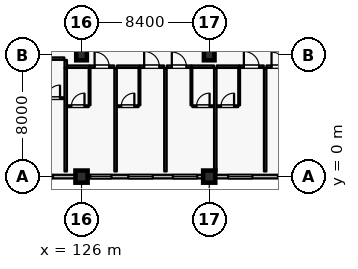
"""IFC4 building model, lengths in metres.
Left out: names, types, materials, properties, quantities, classifications, styles, units other than length and angle.
Written with IfcOpenShell. Run it as: python <this file> out.ifc"""

import sys

from ifc_helpers import new_model, si_unit, direction, frame, frame_2d, origin, origin_2d, place, context, subcontext, project, spatial, rectangle, extrude, element, fill, save


model = new_model("IFC4")
c1 = context("Model", 3, precision=1e-05, world=origin(), true_north=direction((0.0, 1.0)))
c2 = subcontext(c1, "Body", "Model", "MODEL_VIEW")
j1 = project(units=[si_unit("LENGTHUNIT", "METRE"), si_unit("PLANEANGLEUNIT", "RADIAN")], contexts=[c1])
p1 = place(None, origin())
s1 = spatial("IfcSite", under=j1, at=p1, CompositionType="ELEMENT")
p2 = place(p1, origin())
s2 = spatial("IfcBuilding", under=s1, at=p2, CompositionType="ELEMENT")
p3 = place(p2, frame((0.0, 0.0, 16.2)))
s3 = spatial("IfcBuildingStorey", under=s2, at=p3, CompositionType="ELEMENT", Elevation=16.2)
for number, where, z_axis, x_axis in (
    (1, (126.0, 0.0, 0.0), (0.0, 0.0, 1.0), (1.0, 0.0, 0.0)),
    (2, (134.4, 0.0, 0.0), (0.0, 0.0, 1.0), (1.0, 0.0, 0.0)),
):
    element("IfcColumn", number, at=place(p3, frame(where, z_axis=z_axis, x_axis=x_axis)), inside=s3, PredefinedType="COLUMN", context=c2, shape_type="SweptSolid", body=[
        extrude(rectangle(XDim=0.8, YDim=0.8, at=origin_2d()), origin(), (0.0, 0.0, 1.0), 4.8),
    ])
for number, where, z_axis, x_axis in (
    (3, (126.0, 8.0, 0.0), (0.0, 0.0, 1.0), (1.0, 0.0, 0.0)),
    (4, (134.4, 8.0, 0.0), (0.0, 0.0, 1.0), (1.0, 0.0, 0.0)),
):
    element("IfcColumn", number, at=place(p3, frame(where, z_axis=z_axis, x_axis=x_axis)), inside=s3, PredefinedType="COLUMN", context=c2, shape_type="SweptSolid", body=[
        extrude(rectangle(XDim=0.7, YDim=0.7, at=origin_2d()), origin(), (0.0, 0.0, 1.0), 4.8),
    ])
p4 = place(p3, frame((125.6, 0.0, 0.0), z_axis=(0.0, 0.0, 1.0), x_axis=(-1.0, 0.0, 0.0)))
e5 = element("IfcWall", 5, at=p4, inside=s3, PredefinedType="SOLIDWALL", context=c2, shape_type="SweptSolid", body=[
    extrude(rectangle(XDim=7.6, YDim=0.24, at=frame_2d((3.8, 0.0))), origin(), (0.0, 0.0, 1.0), 4.13),
])
p5 = place(p4, frame((1.48, 0.0, 0.8)))
e6 = element("IfcOpeningElement", 6, at=p5, cuts=e5, PredefinedType="OPENING", context=c2, shape_type="SweptSolid", body=[
    extrude(rectangle(XDim=1.6, YDim=1.6, at=frame_2d((0.8, 0.8))), frame((0.0, 0.13, 0.0), z_axis=(0.0, -1.0, 0.0), x_axis=(1.0, 0.0, 0.0)), (0.0, 0.0, 1.0), 0.26),
])
p6 = place(p4, frame((4.76, 0.0, 0.8)))
e7 = element("IfcOpeningElement", 7, at=p6, cuts=e5, PredefinedType="OPENING", context=c2, shape_type="SweptSolid", body=[
    extrude(rectangle(XDim=1.6, YDim=1.6, at=frame_2d((0.8, 0.8))), frame((0.0, 0.13, 0.0), z_axis=(0.0, -1.0, 0.0), x_axis=(1.0, 0.0, 0.0)), (0.0, 0.0, 1.0), 0.26),
])
p7 = place(p3, frame((134.0, 0.0, 0.0), z_axis=(0.0, 0.0, 1.0), x_axis=(-1.0, 0.0, 0.0)))
e8 = element("IfcWall", 8, at=p7, inside=s3, PredefinedType="SOLIDWALL", context=c2, shape_type="SweptSolid", body=[
    extrude(rectangle(XDim=7.6, YDim=0.24, at=frame_2d((3.8, 0.0))), origin(), (0.0, 0.0, 1.0), 4.13),
])
p8 = place(p7, frame((0.39, 0.0, 0.8)))
e9 = element("IfcOpeningElement", 9, at=p8, cuts=e8, PredefinedType="OPENING", context=c2, shape_type="SweptSolid", body=[
    extrude(rectangle(XDim=1.6, YDim=1.6, at=frame_2d((0.8, 0.8))), frame((0.0, 0.13, 0.0), z_axis=(0.0, -1.0, 0.0), x_axis=(1.0, 0.0, 0.0)), (0.0, 0.0, 1.0), 0.26),
])
p9 = place(p7, frame((3.32, 0.0, 0.8)))
e10 = element("IfcOpeningElement", 10, at=p9, cuts=e8, PredefinedType="OPENING", context=c2, shape_type="SweptSolid", body=[
    extrude(rectangle(XDim=1.6, YDim=1.6, at=frame_2d((0.8, 0.8))), frame((0.0, 0.13, 0.0), z_axis=(0.0, -1.0, 0.0), x_axis=(1.0, 0.0, 0.0)), (0.0, 0.0, 1.0), 0.26),
])
p10 = place(p7, frame((6.03, 0.0, 0.8)))
e11 = element("IfcOpeningElement", 11, at=p10, cuts=e8, PredefinedType="OPENING", context=c2, shape_type="SweptSolid", body=[
    extrude(rectangle(XDim=1.4, YDim=1.6, at=frame_2d((0.7, 0.8))), frame((0.0, 0.13, 0.0), z_axis=(0.0, -1.0, 0.0), x_axis=(1.0, 0.0, 0.0)), (0.0, 0.0, 1.0), 0.26),
])
p11 = place(p3, frame((142.4, 0.0, 0.0), z_axis=(0.0, 0.0, 1.0), x_axis=(-1.0, 0.0, 0.0)))
e12 = element("IfcWall", 12, at=p11, inside=s3, PredefinedType="SOLIDWALL", context=c2, shape_type="SweptSolid", body=[
    extrude(rectangle(XDim=7.6, YDim=0.24, at=frame_2d((3.8, 0.0))), origin(), (0.0, 0.0, 1.0), 4.13),
])
p12 = place(p11, frame((1.88, 0.0, 0.8)))
e13 = element("IfcOpeningElement", 13, at=p12, cuts=e12, PredefinedType="OPENING", context=c2, shape_type="SweptSolid", body=[
    extrude(rectangle(XDim=1.6, YDim=1.6, at=frame_2d((0.8, 0.8))), frame((0.0, 0.13, 0.0), z_axis=(0.0, -1.0, 0.0), x_axis=(1.0, 0.0, 0.0)), (0.0, 0.0, 1.0), 0.26),
])
p13 = place(p11, frame((5.16, 0.0, 0.8)))
e14 = element("IfcOpeningElement", 14, at=p13, cuts=e12, PredefinedType="OPENING", context=c2, shape_type="SweptSolid", body=[
    extrude(rectangle(XDim=1.6, YDim=1.6, at=frame_2d((0.8, 0.8))), frame((0.0, 0.13, 0.0), z_axis=(0.0, -1.0, 0.0), x_axis=(1.0, 0.0, 0.0)), (0.0, 0.0, 1.0), 0.26),
])
p14 = place(p3, frame((123.4, 7.76, 0.0), z_axis=(0.0, 0.0, 1.0), x_axis=(1.0, 0.0, 0.0)))
e15 = element("IfcWall", 15, at=p14, inside=s3, PredefinedType="PARTITIONING", context=c2, shape_type="SweptSolid", body=[
    extrude(rectangle(XDim=1.47, YDim=0.16, at=frame_2d((0.735, 0.0))), origin(), (0.0, 0.0, 1.0), 4.535),
])
p15 = place(p3, frame((123.45, 5.16, 0.0), z_axis=(0.0, 0.0, 1.0), x_axis=(1.0, 0.0, 0.0)))
e16 = element("IfcWall", 16, at=p15, inside=s3, PredefinedType="PARTITIONING", context=c2, shape_type="SweptSolid", body=[
    extrude(rectangle(XDim=1.41, YDim=0.115, at=frame_2d((0.705, 0.0))), origin(), (0.0, 0.0, 1.0), 4.535),
])
p16 = place(p15, frame((0.275, 0.0, 0.0)))
e17 = element("IfcOpeningElement", 17, at=p16, cuts=e16, PredefinedType="OPENING", context=c2, shape_type="SweptSolid", body=[
    extrude(rectangle(XDim=0.86, YDim=2.12, at=frame_2d((0.43, 1.06))), frame((0.0, 0.067, 0.0), z_axis=(0.0, -1.0, 0.0), x_axis=(1.0, 0.0, 0.0)), (0.0, 0.0, 1.0), 0.135),
])
p17 = place(p3, frame((124.96, 7.15, 0.0), z_axis=(0.0, 0.0, 1.0), x_axis=(0.0, 1.0, 0.0)))
e18 = element("IfcWall", 18, at=p17, inside=s3, PredefinedType="PARTITIONING", context=c2, shape_type="SweptSolid", body=[
    extrude(rectangle(XDim=0.52, YDim=0.16, at=frame_2d((0.26, 0.0))), origin(), (0.0, 0.0, 1.0), 4.535),
])
p18 = place(p3, frame((125.05, 7.23, 0.0), z_axis=(0.0, 0.0, 1.0), x_axis=(1.0, 0.0, 0.0)))
e19 = element("IfcWall", 19, at=p18, inside=s3, PredefinedType="PARTITIONING", context=c2, shape_type="SweptSolid", body=[
    extrude(rectangle(XDim=1.47, YDim=0.16, at=frame_2d((0.735, 0.0))), origin(), (0.0, 0.0, 1.0), 4.535),
])
p19 = place(p3, frame((126.53, 7.23, 0.0), z_axis=(0.0, 0.0, 1.0), x_axis=(1.0, 0.0, 0.0)))
e20 = element("IfcWall", 20, at=p19, inside=s3, PredefinedType="PARTITIONING", context=c2, shape_type="SweptSolid", body=[
    extrude(rectangle(XDim=1.62, YDim=0.16, at=frame_2d((0.81, 0.0))), origin(), (0.0, 0.0, 1.0), 4.535),
])
p20 = place(p19, frame((0.33, 0.0, 0.0)))
e21 = element("IfcOpeningElement", 21, at=p20, cuts=e20, PredefinedType="OPENING", context=c2, shape_type="SweptSolid", body=[
    extrude(rectangle(XDim=0.96, YDim=2.2, at=frame_2d((0.48, 1.1))), frame((0.0, 0.09, 0.0), z_axis=(0.0, -1.0, 0.0), x_axis=(1.0, 0.0, 0.0)), (0.0, 0.0, 1.0), 0.18),
])
p21 = place(p3, frame((126.53, 4.69, 0.0), z_axis=(0.0, 0.0, 1.0), x_axis=(0.0, 1.0, 0.0)))
e22 = element("IfcWall", 22, at=p21, inside=s3, PredefinedType="PARTITIONING", context=c2, shape_type="SweptSolid", body=[
    extrude(rectangle(XDim=2.45, YDim=0.115, at=frame_2d((1.225, 0.0))), origin(), (0.0, 0.0, 1.0), 4.535),
])
p22 = place(p3, frame((125.06, 4.63, 0.0), z_axis=(0.0, 0.0, 1.0), x_axis=(1.0, 0.0, 0.0)))
e23 = element("IfcWall", 23, at=p22, inside=s3, PredefinedType="PARTITIONING", context=c2, shape_type="SweptSolid", body=[
    extrude(rectangle(XDim=1.41, YDim=0.115, at=frame_2d((0.705, 0.0))), origin(), (0.0, 0.0, 1.0), 4.535),
])
p23 = place(p22, frame((0.275, 0.0, 0.0)))
e24 = element("IfcOpeningElement", 24, at=p23, cuts=e23, PredefinedType="OPENING", context=c2, shape_type="SweptSolid", body=[
    extrude(rectangle(XDim=0.86, YDim=2.12, at=frame_2d((0.43, 1.06))), frame((0.0, 0.067, 0.0), z_axis=(0.0, -1.0, 0.0), x_axis=(1.0, 0.0, 0.0)), (0.0, 0.0, 1.0), 0.135),
])
p24 = place(p3, frame((124.96, 0.34, 0.0), z_axis=(0.0, 0.0, 1.0), x_axis=(0.0, 1.0, 0.0)))
e25 = element("IfcWall", 25, at=p24, inside=s3, PredefinedType="PARTITIONING", context=c2, shape_type="SweptSolid", body=[
    extrude(rectangle(XDim=6.8, YDim=0.16, at=frame_2d((3.4, 0.0))), origin(), (0.0, 0.0, 1.0), 4.535),
])
p25 = place(p3, frame((128.33, 7.23, 0.0), z_axis=(0.0, 0.0, 1.0), x_axis=(1.0, 0.0, 0.0)))
e26 = element("IfcWall", 26, at=p25, inside=s3, PredefinedType="PARTITIONING", context=c2, shape_type="SweptSolid", body=[
    extrude(rectangle(XDim=1.47, YDim=0.16, at=frame_2d((0.735, 0.0))), origin(), (0.0, 0.0, 1.0), 4.535),
])
p26 = place(p3, frame((129.81, 7.23, 0.0), z_axis=(0.0, 0.0, 1.0), x_axis=(1.0, 0.0, 0.0)))
e27 = element("IfcWall", 27, at=p26, inside=s3, PredefinedType="PARTITIONING", context=c2, shape_type="SweptSolid", body=[
    extrude(rectangle(XDim=1.62, YDim=0.16, at=frame_2d((0.81, 0.0))), origin(), (0.0, 0.0, 1.0), 4.535),
])
p27 = place(p26, frame((0.31, 0.0, 0.0)))
e28 = element("IfcOpeningElement", 28, at=p27, cuts=e27, PredefinedType="OPENING", context=c2, shape_type="SweptSolid", body=[
    extrude(rectangle(XDim=1.0, YDim=2.25, at=frame_2d((0.5, 1.125))), frame((0.0, 0.09, 0.0), z_axis=(0.0, -1.0, 0.0), x_axis=(1.0, 0.0, 0.0)), (0.0, 0.0, 1.0), 0.18),
])
p28 = place(p3, frame((129.81, 4.69, 0.0), z_axis=(0.0, 0.0, 1.0), x_axis=(0.0, 1.0, 0.0)))
e29 = element("IfcWall", 29, at=p28, inside=s3, PredefinedType="PARTITIONING", context=c2, shape_type="SweptSolid", body=[
    extrude(rectangle(XDim=2.45, YDim=0.115, at=frame_2d((1.225, 0.0))), origin(), (0.0, 0.0, 1.0), 4.535),
])
p29 = place(p3, frame((128.34, 4.63, 0.0), z_axis=(0.0, 0.0, 1.0), x_axis=(1.0, 0.0, 0.0)))
e30 = element("IfcWall", 30, at=p29, inside=s3, PredefinedType="PARTITIONING", context=c2, shape_type="SweptSolid", body=[
    extrude(rectangle(XDim=1.41, YDim=0.115, at=frame_2d((0.705, 0.0))), origin(), (0.0, 0.0, 1.0), 4.535),
])
p30 = place(p29, frame((0.275, 0.0, 0.0)))
e31 = element("IfcOpeningElement", 31, at=p30, cuts=e30, PredefinedType="OPENING", context=c2, shape_type="SweptSolid", body=[
    extrude(rectangle(XDim=0.86, YDim=2.12, at=frame_2d((0.43, 1.06))), frame((0.0, 0.067, 0.0), z_axis=(0.0, -1.0, 0.0), x_axis=(1.0, 0.0, 0.0)), (0.0, 0.0, 1.0), 0.135),
])
p31 = place(p3, frame((128.24, 0.34, 0.0), z_axis=(0.0, 0.0, 1.0), x_axis=(0.0, 1.0, 0.0)))
e32 = element("IfcWall", 32, at=p31, inside=s3, PredefinedType="PARTITIONING", context=c2, shape_type="SweptSolid", body=[
    extrude(rectangle(XDim=6.8, YDim=0.16, at=frame_2d((3.4, 0.0))), origin(), (0.0, 0.0, 1.0), 4.535),
])
p32 = place(p3, frame((131.61, 7.23, 0.0), z_axis=(0.0, 0.0, 1.0), x_axis=(1.0, 0.0, 0.0)))
e33 = element("IfcWall", 33, at=p32, inside=s3, PredefinedType="PARTITIONING", context=c2, shape_type="SweptSolid", body=[
    extrude(rectangle(XDim=1.62, YDim=0.16, at=frame_2d((0.81, 0.0))), origin(), (0.0, 0.0, 1.0), 4.535),
])
p33 = place(p32, frame((0.33, 0.0, 0.0)))
e34 = element("IfcOpeningElement", 34, at=p33, cuts=e33, PredefinedType="OPENING", context=c2, shape_type="SweptSolid", body=[
    extrude(rectangle(XDim=0.96, YDim=2.2, at=frame_2d((0.48, 1.1))), frame((0.0, 0.09, 0.0), z_axis=(0.0, -1.0, 0.0), x_axis=(1.0, 0.0, 0.0)), (0.0, 0.0, 1.0), 0.18),
])
p34 = place(p3, frame((133.24, 7.23, 0.0), z_axis=(0.0, 0.0, 1.0), x_axis=(1.0, 0.0, 0.0)))
e35 = element("IfcWall", 35, at=p34, inside=s3, PredefinedType="PARTITIONING", context=c2, shape_type="SweptSolid", body=[
    extrude(rectangle(XDim=1.47, YDim=0.16, at=frame_2d((0.735, 0.0))), origin(), (0.0, 0.0, 1.0), 4.535),
])
p35 = place(p3, frame((133.23, 4.69, 0.0), z_axis=(0.0, 0.0, 1.0), x_axis=(0.0, 1.0, 0.0)))
e36 = element("IfcWall", 36, at=p35, inside=s3, PredefinedType="PARTITIONING", context=c2, shape_type="SweptSolid", body=[
    extrude(rectangle(XDim=2.45, YDim=0.115, at=frame_2d((1.225, 0.0))), origin(), (0.0, 0.0, 1.0), 4.535),
])
p36 = place(p3, frame((133.29, 4.63, 0.0), z_axis=(0.0, 0.0, 1.0), x_axis=(1.0, 0.0, 0.0)))
e37 = element("IfcWall", 37, at=p36, inside=s3, PredefinedType="PARTITIONING", context=c2, shape_type="SweptSolid", body=[
    extrude(rectangle(XDim=1.41, YDim=0.115, at=frame_2d((0.705, 0.0))), origin(), (0.0, 0.0, 1.0), 4.535),
])
p37 = place(p36, frame((0.275, 0.0, 0.0)))
e38 = element("IfcOpeningElement", 38, at=p37, cuts=e37, PredefinedType="OPENING", context=c2, shape_type="SweptSolid", body=[
    extrude(rectangle(XDim=0.86, YDim=2.12, at=frame_2d((0.43, 1.06))), frame((0.0, 0.067, 0.0), z_axis=(0.0, -1.0, 0.0), x_axis=(1.0, 0.0, 0.0)), (0.0, 0.0, 1.0), 0.135),
])
p38 = place(p3, frame((131.52, 0.34, 0.0), z_axis=(0.0, 0.0, 1.0), x_axis=(0.0, 1.0, 0.0)))
e39 = element("IfcWall", 39, at=p38, inside=s3, PredefinedType="PARTITIONING", context=c2, shape_type="SweptSolid", body=[
    extrude(rectangle(XDim=6.8, YDim=0.16, at=frame_2d((3.4, 0.0))), origin(), (0.0, 0.0, 1.0), 4.535),
])
p39 = place(p3, frame((134.89, 7.23, 0.0), z_axis=(0.0, 0.0, 1.0), x_axis=(1.0, 0.0, 0.0)))
e40 = element("IfcWall", 40, at=p39, inside=s3, PredefinedType="PARTITIONING", context=c2, shape_type="SweptSolid", body=[
    extrude(rectangle(XDim=1.47, YDim=0.16, at=frame_2d((0.735, 0.0))), origin(), (0.0, 0.0, 1.0), 4.535),
])
p40 = place(p3, frame((136.37, 7.23, 0.0), z_axis=(0.0, 0.0, 1.0), x_axis=(1.0, 0.0, 0.0)))
e41 = element("IfcWall", 41, at=p40, inside=s3, PredefinedType="PARTITIONING", context=c2, shape_type="SweptSolid", body=[
    extrude(rectangle(XDim=1.62, YDim=0.16, at=frame_2d((0.81, 0.0))), origin(), (0.0, 0.0, 1.0), 4.535),
])
p41 = place(p40, frame((0.31, 0.0, 0.0)))
e42 = element("IfcOpeningElement", 42, at=p41, cuts=e41, PredefinedType="OPENING", context=c2, shape_type="SweptSolid", body=[
    extrude(rectangle(XDim=1.0, YDim=2.25, at=frame_2d((0.5, 1.125))), frame((0.0, 0.09, 0.0), z_axis=(0.0, -1.0, 0.0), x_axis=(1.0, 0.0, 0.0)), (0.0, 0.0, 1.0), 0.18),
])
p42 = place(p3, frame((136.37, 4.69, 0.0), z_axis=(0.0, 0.0, 1.0), x_axis=(0.0, 1.0, 0.0)))
e43 = element("IfcWall", 43, at=p42, inside=s3, PredefinedType="PARTITIONING", context=c2, shape_type="SweptSolid", body=[
    extrude(rectangle(XDim=2.45, YDim=0.115, at=frame_2d((1.225, 0.0))), origin(), (0.0, 0.0, 1.0), 4.535),
])
p43 = place(p3, frame((134.9, 4.63, 0.0), z_axis=(0.0, 0.0, 1.0), x_axis=(1.0, 0.0, 0.0)))
e44 = element("IfcWall", 44, at=p43, inside=s3, PredefinedType="PARTITIONING", context=c2, shape_type="SweptSolid", body=[
    extrude(rectangle(XDim=1.41, YDim=0.115, at=frame_2d((0.705, 0.0))), origin(), (0.0, 0.0, 1.0), 4.535),
])
p44 = place(p43, frame((0.275, 0.0, 0.0)))
e45 = element("IfcOpeningElement", 45, at=p44, cuts=e44, PredefinedType="OPENING", context=c2, shape_type="SweptSolid", body=[
    extrude(rectangle(XDim=0.86, YDim=2.12, at=frame_2d((0.43, 1.06))), frame((0.0, 0.067, 0.0), z_axis=(0.0, -1.0, 0.0), x_axis=(1.0, 0.0, 0.0)), (0.0, 0.0, 1.0), 0.135),
])
p45 = place(p3, frame((134.8, 0.34, 0.0), z_axis=(0.0, 0.0, 1.0), x_axis=(0.0, 1.0, 0.0)))
e46 = element("IfcWall", 46, at=p45, inside=s3, PredefinedType="PARTITIONING", context=c2, shape_type="SweptSolid", body=[
    extrude(rectangle(XDim=6.8, YDim=0.16, at=frame_2d((3.4, 0.0))), origin(), (0.0, 0.0, 1.0), 4.535),
])
p46 = place(p3, frame((138.17, 7.23, 0.0), z_axis=(0.0, 0.0, 1.0), x_axis=(1.0, 0.0, 0.0)))
e47 = element("IfcWall", 47, at=p46, inside=s3, PredefinedType="PARTITIONING", context=c2, shape_type="SweptSolid", body=[
    extrude(rectangle(XDim=1.62, YDim=0.16, at=frame_2d((0.81, 0.0))), origin(), (0.0, 0.0, 1.0), 4.535),
])
p47 = place(p46, frame((0.33, 0.0, 0.0)))
e48 = element("IfcOpeningElement", 48, at=p47, cuts=e47, PredefinedType="OPENING", context=c2, shape_type="SweptSolid", body=[
    extrude(rectangle(XDim=0.96, YDim=2.2, at=frame_2d((0.48, 1.1))), frame((0.0, 0.09, 0.0), z_axis=(0.0, -1.0, 0.0), x_axis=(1.0, 0.0, 0.0)), (0.0, 0.0, 1.0), 0.18),
])
p48 = place(p3, frame((138.08, 0.34, 0.0), z_axis=(0.0, 0.0, 1.0), x_axis=(0.0, 1.0, 0.0)))
e49 = element("IfcWall", 49, at=p48, inside=s3, PredefinedType="PARTITIONING", context=c2, shape_type="SweptSolid", body=[
    extrude(rectangle(XDim=6.8, YDim=0.16, at=frame_2d((3.4, 0.0))), origin(), (0.0, 0.0, 1.0), 4.535),
])
p49 = place(p5, origin())
e50 = element("IfcWindow", 50, at=p49, inside=s3, PartitioningType="SINGLE_PANEL", PredefinedType="WINDOW", context=c2, shape_type="SweptSolid", body=[
    extrude(rectangle(XDim=1.6, YDim=1.6, at=frame_2d((0.8, 0.8))), frame((0.0, 0.03, 0.0), z_axis=(0.0, -1.0, 0.0), x_axis=(1.0, 0.0, 0.0)), (0.0, 0.0, 1.0), 0.06),
])
fill(e6, e50)
p50 = place(p8, origin())
e51 = element("IfcWindow", 51, at=p50, inside=s3, PartitioningType="SINGLE_PANEL", PredefinedType="WINDOW", context=c2, shape_type="SweptSolid", body=[
    extrude(rectangle(XDim=1.6, YDim=1.6, at=frame_2d((0.8, 0.8))), frame((0.0, 0.03, 0.0), z_axis=(0.0, -1.0, 0.0), x_axis=(1.0, 0.0, 0.0)), (0.0, 0.0, 1.0), 0.06),
])
fill(e9, e51)
p51 = place(p9, origin())
e52 = element("IfcWindow", 52, at=p51, inside=s3, PartitioningType="SINGLE_PANEL", PredefinedType="WINDOW", context=c2, shape_type="SweptSolid", body=[
    extrude(rectangle(XDim=1.6, YDim=1.6, at=frame_2d((0.8, 0.8))), frame((0.0, 0.03, 0.0), z_axis=(0.0, -1.0, 0.0), x_axis=(1.0, 0.0, 0.0)), (0.0, 0.0, 1.0), 0.06),
])
fill(e10, e52)
p52 = place(p10, origin())
e53 = element("IfcWindow", 53, at=p52, inside=s3, PartitioningType="SINGLE_PANEL", PredefinedType="WINDOW", context=c2, shape_type="SweptSolid", body=[
    extrude(rectangle(XDim=1.4, YDim=1.6, at=frame_2d((0.7, 0.8))), frame((0.0, 0.03, 0.0), z_axis=(0.0, -1.0, 0.0), x_axis=(1.0, 0.0, 0.0)), (0.0, 0.0, 1.0), 0.06),
])
fill(e11, e53)
p53 = place(p12, origin())
e54 = element("IfcWindow", 54, at=p53, inside=s3, PartitioningType="SINGLE_PANEL", PredefinedType="WINDOW", context=c2, shape_type="SweptSolid", body=[
    extrude(rectangle(XDim=1.6, YDim=1.6, at=frame_2d((0.8, 0.8))), frame((0.0, 0.03, 0.0), z_axis=(0.0, -1.0, 0.0), x_axis=(1.0, 0.0, 0.0)), (0.0, 0.0, 1.0), 0.06),
])
fill(e13, e54)
p54 = place(p13, origin())
e55 = element("IfcWindow", 55, at=p54, inside=s3, PartitioningType="SINGLE_PANEL", PredefinedType="WINDOW", context=c2, shape_type="SweptSolid", body=[
    extrude(rectangle(XDim=1.6, YDim=1.6, at=frame_2d((0.8, 0.8))), frame((0.0, 0.03, 0.0), z_axis=(0.0, -1.0, 0.0), x_axis=(1.0, 0.0, 0.0)), (0.0, 0.0, 1.0), 0.06),
])
fill(e14, e55)
p55 = place(p16, origin())
e56 = element("IfcDoor", 56, at=p55, inside=s3, OperationType="SINGLE_SWING_RIGHT", PredefinedType="DOOR", context=c2, shape_type="SweptSolid", body=[
    extrude(rectangle(XDim=0.86, YDim=2.12, at=frame_2d((0.43, 1.06))), frame((0.0, 0.025, 0.0), z_axis=(0.0, -1.0, 0.0), x_axis=(1.0, 0.0, 0.0)), (0.0, 0.0, 1.0), 0.05),
])
fill(e17, e56)
p56 = place(p20, origin())
e57 = element("IfcDoor", 57, at=p56, inside=s3, OperationType="SINGLE_SWING_LEFT", PredefinedType="DOOR", context=c2, shape_type="SweptSolid", body=[
    extrude(rectangle(XDim=0.96, YDim=2.2, at=frame_2d((0.48, 1.1))), frame((0.0, 0.025, 0.0), z_axis=(0.0, -1.0, 0.0), x_axis=(1.0, 0.0, 0.0)), (0.0, 0.0, 1.0), 0.05),
])
fill(e21, e57)
p57 = place(p23, origin())
e58 = element("IfcDoor", 58, at=p57, inside=s3, OperationType="SINGLE_SWING_RIGHT", PredefinedType="DOOR", context=c2, shape_type="SweptSolid", body=[
    extrude(rectangle(XDim=0.86, YDim=2.12, at=frame_2d((0.43, 1.06))), frame((0.0, 0.025, 0.0), z_axis=(0.0, -1.0, 0.0), x_axis=(1.0, 0.0, 0.0)), (0.0, 0.0, 1.0), 0.05),
])
fill(e24, e58)
p58 = place(p27, origin())
e59 = element("IfcDoor", 59, at=p58, inside=s3, OperationType="SINGLE_SWING_LEFT", PredefinedType="DOOR", context=c2, shape_type="SweptSolid", body=[
    extrude(rectangle(XDim=1.0, YDim=2.25, at=frame_2d((0.5, 1.125))), frame((0.0, 0.025, 0.0), z_axis=(0.0, -1.0, 0.0), x_axis=(1.0, 0.0, 0.0)), (0.0, 0.0, 1.0), 0.05),
])
fill(e28, e59)
p59 = place(p30, origin())
e60 = element("IfcDoor", 60, at=p59, inside=s3, OperationType="SINGLE_SWING_RIGHT", PredefinedType="DOOR", context=c2, shape_type="SweptSolid", body=[
    extrude(rectangle(XDim=0.86, YDim=2.12, at=frame_2d((0.43, 1.06))), frame((0.0, 0.025, 0.0), z_axis=(0.0, -1.0, 0.0), x_axis=(1.0, 0.0, 0.0)), (0.0, 0.0, 1.0), 0.05),
])
fill(e31, e60)
p60 = place(p33, origin())
e61 = element("IfcDoor", 61, at=p60, inside=s3, OperationType="SINGLE_SWING_LEFT", PredefinedType="DOOR", context=c2, shape_type="SweptSolid", body=[
    extrude(rectangle(XDim=0.96, YDim=2.2, at=frame_2d((0.48, 1.1))), frame((0.0, 0.025, 0.0), z_axis=(0.0, -1.0, 0.0), x_axis=(1.0, 0.0, 0.0)), (0.0, 0.0, 1.0), 0.05),
])
fill(e34, e61)
p61 = place(p37, origin())
e62 = element("IfcDoor", 62, at=p61, inside=s3, OperationType="SINGLE_SWING_RIGHT", PredefinedType="DOOR", context=c2, shape_type="SweptSolid", body=[
    extrude(rectangle(XDim=0.86, YDim=2.12, at=frame_2d((0.43, 1.06))), frame((0.0, 0.025, 0.0), z_axis=(0.0, -1.0, 0.0), x_axis=(1.0, 0.0, 0.0)), (0.0, 0.0, 1.0), 0.05),
])
fill(e38, e62)
p62 = place(p41, origin())
e63 = element("IfcDoor", 63, at=p62, inside=s3, OperationType="SINGLE_SWING_LEFT", PredefinedType="DOOR", context=c2, shape_type="SweptSolid", body=[
    extrude(rectangle(XDim=1.0, YDim=2.25, at=frame_2d((0.5, 1.125))), frame((0.0, 0.025, 0.0), z_axis=(0.0, -1.0, 0.0), x_axis=(1.0, 0.0, 0.0)), (0.0, 0.0, 1.0), 0.05),
])
fill(e42, e63)
p63 = place(p44, origin())
e64 = element("IfcDoor", 64, at=p63, inside=s3, OperationType="SINGLE_SWING_RIGHT", PredefinedType="DOOR", context=c2, shape_type="SweptSolid", body=[
    extrude(rectangle(XDim=0.86, YDim=2.12, at=frame_2d((0.43, 1.06))), frame((0.0, 0.025, 0.0), z_axis=(0.0, -1.0, 0.0), x_axis=(1.0, 0.0, 0.0)), (0.0, 0.0, 1.0), 0.05),
])
fill(e45, e64)
p64 = place(p47, origin())
e65 = element("IfcDoor", 65, at=p64, inside=s3, OperationType="SINGLE_SWING_LEFT", PredefinedType="DOOR", context=c2, shape_type="SweptSolid", body=[
    extrude(rectangle(XDim=0.96, YDim=2.2, at=frame_2d((0.48, 1.1))), frame((0.0, 0.025, 0.0), z_axis=(0.0, -1.0, 0.0), x_axis=(1.0, 0.0, 0.0)), (0.0, 0.0, 1.0), 0.05),
])
fill(e48, e65)
save(model, sys.argv[1])
